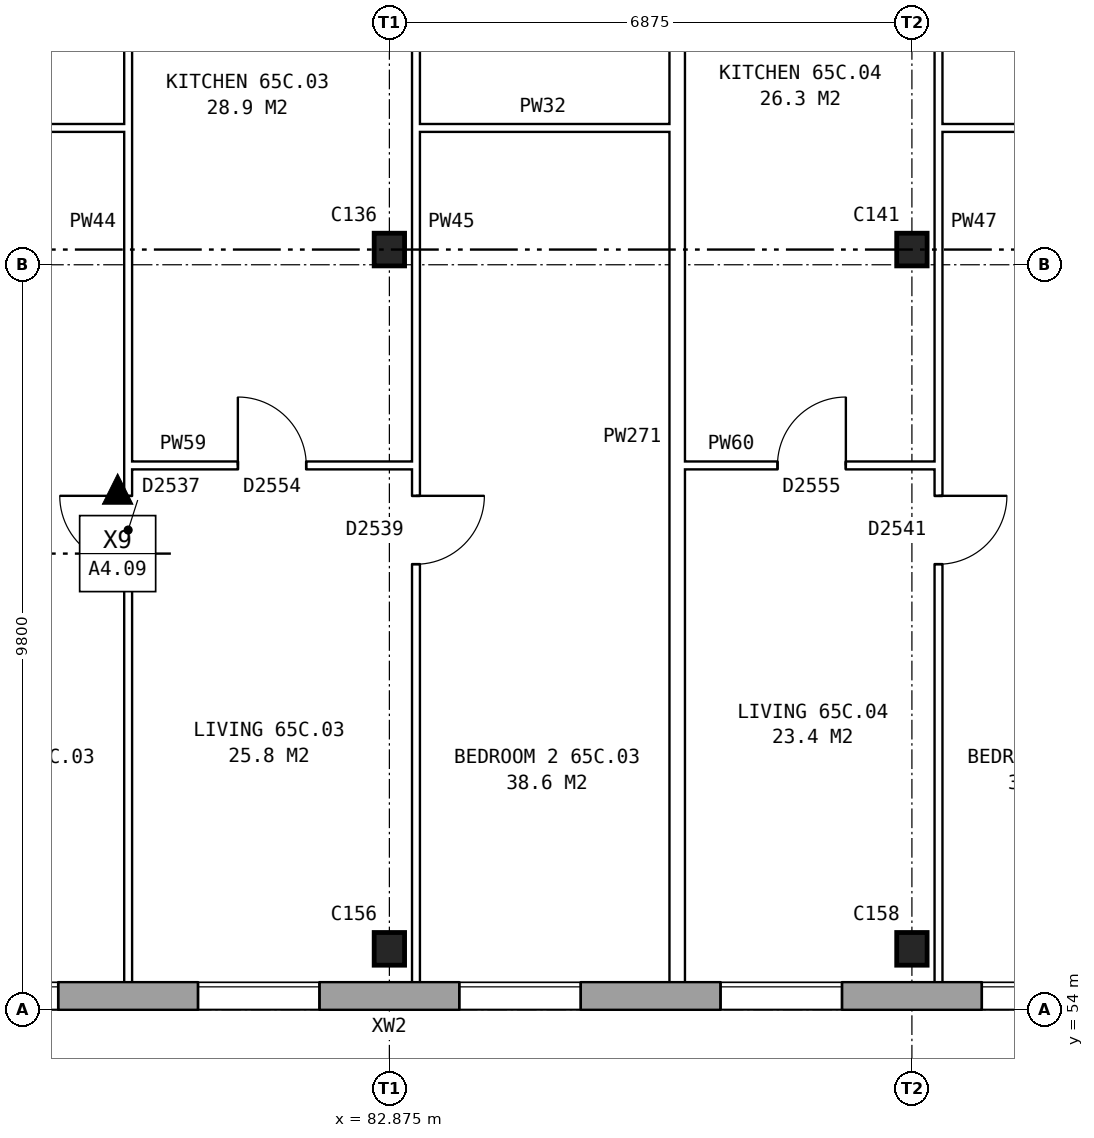
"""IFC4 building model, lengths in metres.
Left out: names, types, materials, properties, quantities, classifications, styles, units other than length and angle.
Written with IfcOpenShell. Run it as: python <this file> out.ifc"""

import sys

from ifc_helpers import new_model, si_unit, direction, frame, frame_2d, origin, origin_2d, place, context, subcontext, project, spatial, rectangle, i_section, extrude, element, fill, save


model = new_model("IFC4")
c1 = context("Model", 3, precision=1e-05, world=origin(), true_north=direction((0.0, 1.0)))
c2 = subcontext(c1, "Body", "Model", "MODEL_VIEW")
j1 = project(units=[si_unit("LENGTHUNIT", "METRE"), si_unit("PLANEANGLEUNIT", "RADIAN")], contexts=[c1])
p1 = place(None, origin())
s1 = spatial("IfcSite", under=j1, at=p1, CompositionType="ELEMENT")
p2 = place(p1, origin())
s2 = spatial("IfcBuilding", under=s1, at=p2, CompositionType="ELEMENT")
p3 = place(p2, frame((0.0, 0.0, 230.7)))
s3 = spatial("IfcBuildingStorey", under=s2, at=p3, CompositionType="ELEMENT", Elevation=230.7)
for number, where, z_axis, x_axis in (
    (1, (82.875, 54.8, 0.0), (0.0, 0.0, 1.0), (1.0, 0.0, 0.0)),
    (2, (89.75, 54.8, 0.0), (0.0, 0.0, 1.0), (1.0, 0.0, 0.0)),
    (3, (82.875, 64.0, 0.0), (0.0, 0.0, 1.0), (1.0, 0.0, 0.0)),
    (4, (89.75, 64.0, 0.0), (0.0, 0.0, 1.0), (1.0, 0.0, 0.0)),
):
    element("IfcColumn", number, at=place(p3, frame(where, z_axis=z_axis, x_axis=x_axis)), inside=s3, PredefinedType="COLUMN", context=c2, shape_type="SweptSolid", body=[
        extrude(i_section(OverallWidth=0.4, OverallDepth=0.43, WebThickness=0.028, FlangeThickness=0.04, at=origin_2d()), origin(), (0.0, 0.0, 1.0), 2.85),
    ])
p4 = place(p3, frame((75.95, 54.18, 0.0), z_axis=(0.0, 0.0, 1.0), x_axis=(1.0, 0.0, 0.0)))
e5 = element("IfcWall", 5, at=p4, inside=s3, PredefinedType="STANDARD", context=c2, shape_type="SweptSolid", body=[
    extrude(rectangle(XDim=55.1, YDim=0.36, at=frame_2d((27.55, 0.0))), origin(), (0.0, 0.0, 1.0), 2.85),
])
p5 = place(p4, frame((0.969, 0.0, 0.8)))
e6 = element("IfcOpeningElement", 6, at=p5, cuts=e5, PredefinedType="OPENING", context=c2, shape_type="SweptSolid", body=[
    extrude(rectangle(XDim=1.6, YDim=1.8, at=frame_2d((0.8, 0.9))), frame((0.0, 0.19, 0.0), z_axis=(0.0, -1.0, 0.0), x_axis=(1.0, 0.0, 0.0)), (0.0, 0.0, 1.0), 0.38),
])
p6 = place(p4, frame((4.406, 0.0, 0.8)))
e7 = element("IfcOpeningElement", 7, at=p6, cuts=e5, PredefinedType="OPENING", context=c2, shape_type="SweptSolid", body=[
    extrude(rectangle(XDim=1.6, YDim=1.8, at=frame_2d((0.8, 0.9))), frame((0.0, 0.19, 0.0), z_axis=(0.0, -1.0, 0.0), x_axis=(1.0, 0.0, 0.0)), (0.0, 0.0, 1.0), 0.38),
])
p7 = place(p4, frame((7.844, 0.0, 0.8)))
e8 = element("IfcOpeningElement", 8, at=p7, cuts=e5, PredefinedType="OPENING", context=c2, shape_type="SweptSolid", body=[
    extrude(rectangle(XDim=1.6, YDim=1.8, at=frame_2d((0.8, 0.9))), frame((0.0, 0.19, 0.0), z_axis=(0.0, -1.0, 0.0), x_axis=(1.0, 0.0, 0.0)), (0.0, 0.0, 1.0), 0.38),
])
p8 = place(p4, frame((11.281, 0.0, 0.8)))
e9 = element("IfcOpeningElement", 9, at=p8, cuts=e5, PredefinedType="OPENING", context=c2, shape_type="SweptSolid", body=[
    extrude(rectangle(XDim=1.6, YDim=1.8, at=frame_2d((0.8, 0.9))), frame((0.0, 0.19, 0.0), z_axis=(0.0, -1.0, 0.0), x_axis=(1.0, 0.0, 0.0)), (0.0, 0.0, 1.0), 0.38),
])
p9 = place(p4, frame((14.719, 0.0, 0.8)))
e10 = element("IfcOpeningElement", 10, at=p9, cuts=e5, PredefinedType="OPENING", context=c2, shape_type="SweptSolid", body=[
    extrude(rectangle(XDim=1.6, YDim=1.8, at=frame_2d((0.8, 0.9))), frame((0.0, 0.19, 0.0), z_axis=(0.0, -1.0, 0.0), x_axis=(1.0, 0.0, 0.0)), (0.0, 0.0, 1.0), 0.38),
])
p10 = place(p4, frame((18.156, 0.0, 0.8)))
e11 = element("IfcOpeningElement", 11, at=p10, cuts=e5, PredefinedType="OPENING", context=c2, shape_type="SweptSolid", body=[
    extrude(rectangle(XDim=1.6, YDim=1.8, at=frame_2d((0.8, 0.9))), frame((0.0, 0.19, 0.0), z_axis=(0.0, -1.0, 0.0), x_axis=(1.0, 0.0, 0.0)), (0.0, 0.0, 1.0), 0.38),
])
p11 = place(p4, frame((21.594, 0.0, 0.8)))
e12 = element("IfcOpeningElement", 12, at=p11, cuts=e5, PredefinedType="OPENING", context=c2, shape_type="SweptSolid", body=[
    extrude(rectangle(XDim=1.6, YDim=1.8, at=frame_2d((0.8, 0.9))), frame((0.0, 0.19, 0.0), z_axis=(0.0, -1.0, 0.0), x_axis=(1.0, 0.0, 0.0)), (0.0, 0.0, 1.0), 0.38),
])
p12 = place(p4, frame((25.031, 0.0, 0.8)))
e13 = element("IfcOpeningElement", 13, at=p12, cuts=e5, PredefinedType="OPENING", context=c2, shape_type="SweptSolid", body=[
    extrude(rectangle(XDim=1.6, YDim=1.8, at=frame_2d((0.8, 0.9))), frame((0.0, 0.19, 0.0), z_axis=(0.0, -1.0, 0.0), x_axis=(1.0, 0.0, 0.0)), (0.0, 0.0, 1.0), 0.38),
])
p13 = place(p4, frame((28.469, 0.0, 0.8)))
e14 = element("IfcOpeningElement", 14, at=p13, cuts=e5, PredefinedType="OPENING", context=c2, shape_type="SweptSolid", body=[
    extrude(rectangle(XDim=1.6, YDim=1.8, at=frame_2d((0.8, 0.9))), frame((0.0, 0.19, 0.0), z_axis=(0.0, -1.0, 0.0), x_axis=(1.0, 0.0, 0.0)), (0.0, 0.0, 1.0), 0.38),
])
p14 = place(p4, frame((31.906, 0.0, 0.8)))
e15 = element("IfcOpeningElement", 15, at=p14, cuts=e5, PredefinedType="OPENING", context=c2, shape_type="SweptSolid", body=[
    extrude(rectangle(XDim=1.6, YDim=1.8, at=frame_2d((0.8, 0.9))), frame((0.0, 0.19, 0.0), z_axis=(0.0, -1.0, 0.0), x_axis=(1.0, 0.0, 0.0)), (0.0, 0.0, 1.0), 0.38),
])
p15 = place(p4, frame((35.344, 0.0, 0.8)))
e16 = element("IfcOpeningElement", 16, at=p15, cuts=e5, PredefinedType="OPENING", context=c2, shape_type="SweptSolid", body=[
    extrude(rectangle(XDim=1.6, YDim=1.8, at=frame_2d((0.8, 0.9))), frame((0.0, 0.19, 0.0), z_axis=(0.0, -1.0, 0.0), x_axis=(1.0, 0.0, 0.0)), (0.0, 0.0, 1.0), 0.38),
])
p16 = place(p4, frame((38.781, 0.0, 0.8)))
e17 = element("IfcOpeningElement", 17, at=p16, cuts=e5, PredefinedType="OPENING", context=c2, shape_type="SweptSolid", body=[
    extrude(rectangle(XDim=1.6, YDim=1.8, at=frame_2d((0.8, 0.9))), frame((0.0, 0.19, 0.0), z_axis=(0.0, -1.0, 0.0), x_axis=(1.0, 0.0, 0.0)), (0.0, 0.0, 1.0), 0.38),
])
p17 = place(p4, frame((42.219, 0.0, 0.8)))
e18 = element("IfcOpeningElement", 18, at=p17, cuts=e5, PredefinedType="OPENING", context=c2, shape_type="SweptSolid", body=[
    extrude(rectangle(XDim=1.6, YDim=1.8, at=frame_2d((0.8, 0.9))), frame((0.0, 0.19, 0.0), z_axis=(0.0, -1.0, 0.0), x_axis=(1.0, 0.0, 0.0)), (0.0, 0.0, 1.0), 0.38),
])
p18 = place(p4, frame((45.656, 0.0, 0.8)))
e19 = element("IfcOpeningElement", 19, at=p18, cuts=e5, PredefinedType="OPENING", context=c2, shape_type="SweptSolid", body=[
    extrude(rectangle(XDim=1.6, YDim=1.8, at=frame_2d((0.8, 0.9))), frame((0.0, 0.19, 0.0), z_axis=(0.0, -1.0, 0.0), x_axis=(1.0, 0.0, 0.0)), (0.0, 0.0, 1.0), 0.38),
])
p19 = place(p4, frame((49.094, 0.0, 0.8)))
e20 = element("IfcOpeningElement", 20, at=p19, cuts=e5, PredefinedType="OPENING", context=c2, shape_type="SweptSolid", body=[
    extrude(rectangle(XDim=1.6, YDim=1.8, at=frame_2d((0.8, 0.9))), frame((0.0, 0.19, 0.0), z_axis=(0.0, -1.0, 0.0), x_axis=(1.0, 0.0, 0.0)), (0.0, 0.0, 1.0), 0.38),
])
p20 = place(p4, frame((52.531, 0.0, 0.8)))
e21 = element("IfcOpeningElement", 21, at=p20, cuts=e5, PredefinedType="OPENING", context=c2, shape_type="SweptSolid", body=[
    extrude(rectangle(XDim=1.6, YDim=1.8, at=frame_2d((0.8, 0.9))), frame((0.0, 0.19, 0.0), z_axis=(0.0, -1.0, 0.0), x_axis=(1.0, 0.0, 0.0)), (0.0, 0.0, 1.0), 0.38),
])
p21 = place(p3, frame((79.438, 61.16, 0.0), z_axis=(0.0, 0.0, 1.0), x_axis=(1.0, 0.0, 0.0)))
e22 = element("IfcWall", 22, at=p21, inside=s3, PredefinedType="PARTITIONING", context=c2, shape_type="SweptSolid", body=[
    extrude(rectangle(XDim=3.787, YDim=0.1, at=frame_2d((1.894, 0.0))), origin(), (0.0, 0.0, 1.0), 2.85),
])
p22 = place(p21, frame((1.444, 0.0, 0.0)))
e23 = element("IfcOpeningElement", 23, at=p22, cuts=e22, PredefinedType="OPENING", context=c2, shape_type="SweptSolid", body=[
    extrude(rectangle(XDim=0.9, YDim=2.1, at=frame_2d((0.45, 1.05))), frame((0.0, 0.06, 0.0), z_axis=(0.0, -1.0, 0.0), x_axis=(1.0, 0.0, 0.0)), (0.0, 0.0, 1.0), 0.12),
])
p23 = place(p3, frame((86.762, 61.16, 0.0), z_axis=(0.0, 0.0, 1.0), x_axis=(1.0, 0.0, 0.0)))
e24 = element("IfcWall", 24, at=p23, inside=s3, PredefinedType="PARTITIONING", context=c2, shape_type="SweptSolid", body=[
    extrude(rectangle(XDim=3.338, YDim=0.1, at=frame_2d((1.669, 0.0))), origin(), (0.0, 0.0, 1.0), 2.85),
])
p24 = place(p23, frame((1.219, 0.0, 0.0)))
e25 = element("IfcOpeningElement", 25, at=p24, cuts=e24, PredefinedType="OPENING", context=c2, shape_type="SweptSolid", body=[
    extrude(rectangle(XDim=0.9, YDim=2.1, at=frame_2d((0.45, 1.05))), frame((0.0, 0.06, 0.0), z_axis=(0.0, -1.0, 0.0), x_axis=(1.0, 0.0, 0.0)), (0.0, 0.0, 1.0), 0.12),
])
p25 = place(p3, frame((75.64, 65.6, 0.0), z_axis=(0.0, 0.0, 1.0), x_axis=(1.0, 0.0, 0.0)))
e26 = element("IfcWall", 26, at=p25, inside=s3, PredefinedType="PARTITIONING", context=c2, shape_type="SweptSolid", body=[
    extrude(rectangle(XDim=3.798, YDim=0.1, at=frame_2d((1.899, 0.0))), origin(), (0.0, 0.0, 1.0), 2.85),
])
for number, where, z_axis, x_axis in (
    (27, (83.225, 65.6, 0.0), (0.0, 0.0, 1.0), (1.0, 0.0, 0.0)),
    (28, (90.1, 65.6, 0.0), (0.0, 0.0, 1.0), (1.0, 0.0, 0.0)),
):
    element("IfcWall", number, at=place(p3, frame(where, z_axis=z_axis, x_axis=x_axis)), inside=s3, PredefinedType="PARTITIONING", context=c2, shape_type="SweptSolid", body=[
        extrude(rectangle(XDim=3.337, YDim=0.1, at=frame_2d((1.668, 0.0))), origin(), (0.0, 0.0, 1.0), 2.85),
    ])
p26 = place(p3, frame((79.438, 54.36, 0.0), z_axis=(0.0, 0.0, 1.0), x_axis=(0.0, 1.0, 0.0)))
e29 = element("IfcWall", 29, at=p26, inside=s3, PredefinedType="PARTITIONING", context=c2, shape_type="SweptSolid", body=[
    extrude(rectangle(XDim=14.34, YDim=0.1, at=frame_2d((7.17, 0.0))), origin(), (0.0, 0.0, 1.0), 2.85),
])
p27 = place(p26, frame((5.5, 0.0, 0.0)))
e30 = element("IfcOpeningElement", 30, at=p27, cuts=e29, PredefinedType="OPENING", context=c2, shape_type="SweptSolid", body=[
    extrude(rectangle(XDim=0.9, YDim=2.1, at=frame_2d((0.45, 1.05))), frame((0.0, 0.06, 0.0), z_axis=(0.0, -1.0, 0.0), x_axis=(1.0, 0.0, 0.0)), (0.0, 0.0, 1.0), 0.12),
])
p28 = place(p26, frame((13.04, 0.0, 0.0)))
e31 = element("IfcOpeningElement", 31, at=p28, cuts=e29, PredefinedType="OPENING", context=c2, shape_type="SweptSolid", body=[
    extrude(rectangle(XDim=0.9, YDim=2.1, at=frame_2d((0.45, 1.05))), frame((0.0, 0.06, 0.0), z_axis=(0.0, -1.0, 0.0), x_axis=(1.0, 0.0, 0.0)), (0.0, 0.0, 1.0), 0.12),
])
p29 = place(p3, frame((83.225, 54.36, 0.0), z_axis=(0.0, 0.0, 1.0), x_axis=(0.0, 1.0, 0.0)))
e32 = element("IfcWall", 32, at=p29, inside=s3, PredefinedType="PARTITIONING", context=c2, shape_type="SweptSolid", body=[
    extrude(rectangle(XDim=14.34, YDim=0.1, at=frame_2d((7.17, 0.0))), origin(), (0.0, 0.0, 1.0), 2.85),
])
p30 = place(p29, frame((5.5, 0.0, 0.0)))
e33 = element("IfcOpeningElement", 33, at=p30, cuts=e32, PredefinedType="OPENING", context=c2, shape_type="SweptSolid", body=[
    extrude(rectangle(XDim=0.9, YDim=2.1, at=frame_2d((0.45, 1.05))), frame((0.0, 0.06, 0.0), z_axis=(0.0, -1.0, 0.0), x_axis=(1.0, 0.0, 0.0)), (0.0, 0.0, 1.0), 0.12),
])
p31 = place(p29, frame((13.04, 0.0, 0.0)))
e34 = element("IfcOpeningElement", 34, at=p31, cuts=e32, PredefinedType="OPENING", context=c2, shape_type="SweptSolid", body=[
    extrude(rectangle(XDim=0.9, YDim=2.1, at=frame_2d((0.45, 1.05))), frame((0.0, 0.06, 0.0), z_axis=(0.0, -1.0, 0.0), x_axis=(1.0, 0.0, 0.0)), (0.0, 0.0, 1.0), 0.12),
])
p32 = place(p3, frame((86.662, 54.36, 0.0), z_axis=(0.0, 0.0, 1.0), x_axis=(0.0, 1.0, 0.0)))
e35 = element("IfcWall", 35, at=p32, inside=s3, PredefinedType="PARTITIONING", context=c2, shape_type="SweptSolid", body=[
    extrude(rectangle(XDim=14.34, YDim=0.2, at=frame_2d((7.17, 0.0))), origin(), (0.0, 0.0, 1.0), 2.85),
])
p33 = place(p3, frame((90.1, 54.36, 0.0), z_axis=(0.0, 0.0, 1.0), x_axis=(0.0, 1.0, 0.0)))
e36 = element("IfcWall", 36, at=p33, inside=s3, PredefinedType="PARTITIONING", context=c2, shape_type="SweptSolid", body=[
    extrude(rectangle(XDim=14.34, YDim=0.1, at=frame_2d((7.17, 0.0))), origin(), (0.0, 0.0, 1.0), 2.85),
])
p34 = place(p33, frame((5.5, 0.0, 0.0)))
e37 = element("IfcOpeningElement", 37, at=p34, cuts=e36, PredefinedType="OPENING", context=c2, shape_type="SweptSolid", body=[
    extrude(rectangle(XDim=0.9, YDim=2.1, at=frame_2d((0.45, 1.05))), frame((0.0, 0.06, 0.0), z_axis=(0.0, -1.0, 0.0), x_axis=(1.0, 0.0, 0.0)), (0.0, 0.0, 1.0), 0.12),
])
p35 = place(p33, frame((13.04, 0.0, 0.0)))
e38 = element("IfcOpeningElement", 38, at=p35, cuts=e36, PredefinedType="OPENING", context=c2, shape_type="SweptSolid", body=[
    extrude(rectangle(XDim=0.9, YDim=2.1, at=frame_2d((0.45, 1.05))), frame((0.0, 0.06, 0.0), z_axis=(0.0, -1.0, 0.0), x_axis=(1.0, 0.0, 0.0)), (0.0, 0.0, 1.0), 0.12),
])
p36 = place(p5, origin())
e39 = element("IfcWindow", 39, at=p36, inside=s3, PartitioningType="SINGLE_PANEL", PredefinedType="WINDOW", context=c2, shape_type="SweptSolid", body=[
    extrude(rectangle(XDim=1.6, YDim=1.8, at=frame_2d((0.8, 0.9))), frame((0.0, 0.15, 0.0), z_axis=(0.0, -1.0, 0.0), x_axis=(1.0, 0.0, 0.0)), (0.0, 0.0, 1.0), 0.06),
])
fill(e6, e39)
p37 = place(p6, origin())
e40 = element("IfcWindow", 40, at=p37, inside=s3, PartitioningType="SINGLE_PANEL", PredefinedType="WINDOW", context=c2, shape_type="SweptSolid", body=[
    extrude(rectangle(XDim=1.6, YDim=1.8, at=frame_2d((0.8, 0.9))), frame((0.0, 0.15, 0.0), z_axis=(0.0, -1.0, 0.0), x_axis=(1.0, 0.0, 0.0)), (0.0, 0.0, 1.0), 0.06),
])
fill(e7, e40)
p38 = place(p7, origin())
e41 = element("IfcWindow", 41, at=p38, inside=s3, PartitioningType="SINGLE_PANEL", PredefinedType="WINDOW", context=c2, shape_type="SweptSolid", body=[
    extrude(rectangle(XDim=1.6, YDim=1.8, at=frame_2d((0.8, 0.9))), frame((0.0, 0.15, 0.0), z_axis=(0.0, -1.0, 0.0), x_axis=(1.0, 0.0, 0.0)), (0.0, 0.0, 1.0), 0.06),
])
fill(e8, e41)
p39 = place(p8, origin())
e42 = element("IfcWindow", 42, at=p39, inside=s3, PartitioningType="SINGLE_PANEL", PredefinedType="WINDOW", context=c2, shape_type="SweptSolid", body=[
    extrude(rectangle(XDim=1.6, YDim=1.8, at=frame_2d((0.8, 0.9))), frame((0.0, 0.15, 0.0), z_axis=(0.0, -1.0, 0.0), x_axis=(1.0, 0.0, 0.0)), (0.0, 0.0, 1.0), 0.06),
])
fill(e9, e42)
p40 = place(p9, origin())
e43 = element("IfcWindow", 43, at=p40, inside=s3, PartitioningType="SINGLE_PANEL", PredefinedType="WINDOW", context=c2, shape_type="SweptSolid", body=[
    extrude(rectangle(XDim=1.6, YDim=1.8, at=frame_2d((0.8, 0.9))), frame((0.0, 0.15, 0.0), z_axis=(0.0, -1.0, 0.0), x_axis=(1.0, 0.0, 0.0)), (0.0, 0.0, 1.0), 0.06),
])
fill(e10, e43)
p41 = place(p27, origin())
e44 = element("IfcDoor", 44, at=p41, inside=s3, OperationType="SINGLE_SWING_RIGHT", PredefinedType="DOOR", context=c2, shape_type="SweptSolid", body=[
    extrude(rectangle(XDim=0.9, YDim=2.1, at=frame_2d((0.45, 1.05))), frame((0.0, 0.025, 0.0), z_axis=(0.0, -1.0, 0.0), x_axis=(1.0, 0.0, 0.0)), (0.0, 0.0, 1.0), 0.05),
])
fill(e30, e44)
p42 = place(p30, frame((0.9, 0.0, 0.0), z_axis=(0.0, 0.0, 1.0), x_axis=(-1.0, 0.0, 0.0)))
e45 = element("IfcDoor", 45, at=p42, inside=s3, OperationType="SINGLE_SWING_LEFT", PredefinedType="DOOR", context=c2, shape_type="SweptSolid", body=[
    extrude(rectangle(XDim=0.9, YDim=2.1, at=frame_2d((0.45, 1.05))), frame((0.0, 0.025, 0.0), z_axis=(0.0, -1.0, 0.0), x_axis=(1.0, 0.0, 0.0)), (0.0, 0.0, 1.0), 0.05),
])
fill(e33, e45)
p43 = place(p22, origin())
e46 = element("IfcDoor", 46, at=p43, inside=s3, OperationType="SINGLE_SWING_LEFT", PredefinedType="DOOR", context=c2, shape_type="SweptSolid", body=[
    extrude(rectangle(XDim=0.9, YDim=2.1, at=frame_2d((0.45, 1.05))), frame((0.0, 0.025, 0.0), z_axis=(0.0, -1.0, 0.0), x_axis=(1.0, 0.0, 0.0)), (0.0, 0.0, 1.0), 0.05),
])
fill(e23, e46)
p44 = place(p34, frame((0.9, 0.0, 0.0), z_axis=(0.0, 0.0, 1.0), x_axis=(-1.0, 0.0, 0.0)))
e47 = element("IfcDoor", 47, at=p44, inside=s3, OperationType="SINGLE_SWING_LEFT", PredefinedType="DOOR", context=c2, shape_type="SweptSolid", body=[
    extrude(rectangle(XDim=0.9, YDim=2.1, at=frame_2d((0.45, 1.05))), frame((0.0, 0.025, 0.0), z_axis=(0.0, -1.0, 0.0), x_axis=(1.0, 0.0, 0.0)), (0.0, 0.0, 1.0), 0.05),
])
fill(e37, e47)
p45 = place(p24, origin())
e48 = element("IfcDoor", 48, at=p45, inside=s3, OperationType="SINGLE_SWING_RIGHT", PredefinedType="DOOR", context=c2, shape_type="SweptSolid", body=[
    extrude(rectangle(XDim=0.9, YDim=2.1, at=frame_2d((0.45, 1.05))), frame((0.0, 0.025, 0.0), z_axis=(0.0, -1.0, 0.0), x_axis=(1.0, 0.0, 0.0)), (0.0, 0.0, 1.0), 0.05),
])
fill(e25, e48)
save(model, sys.argv[1])
